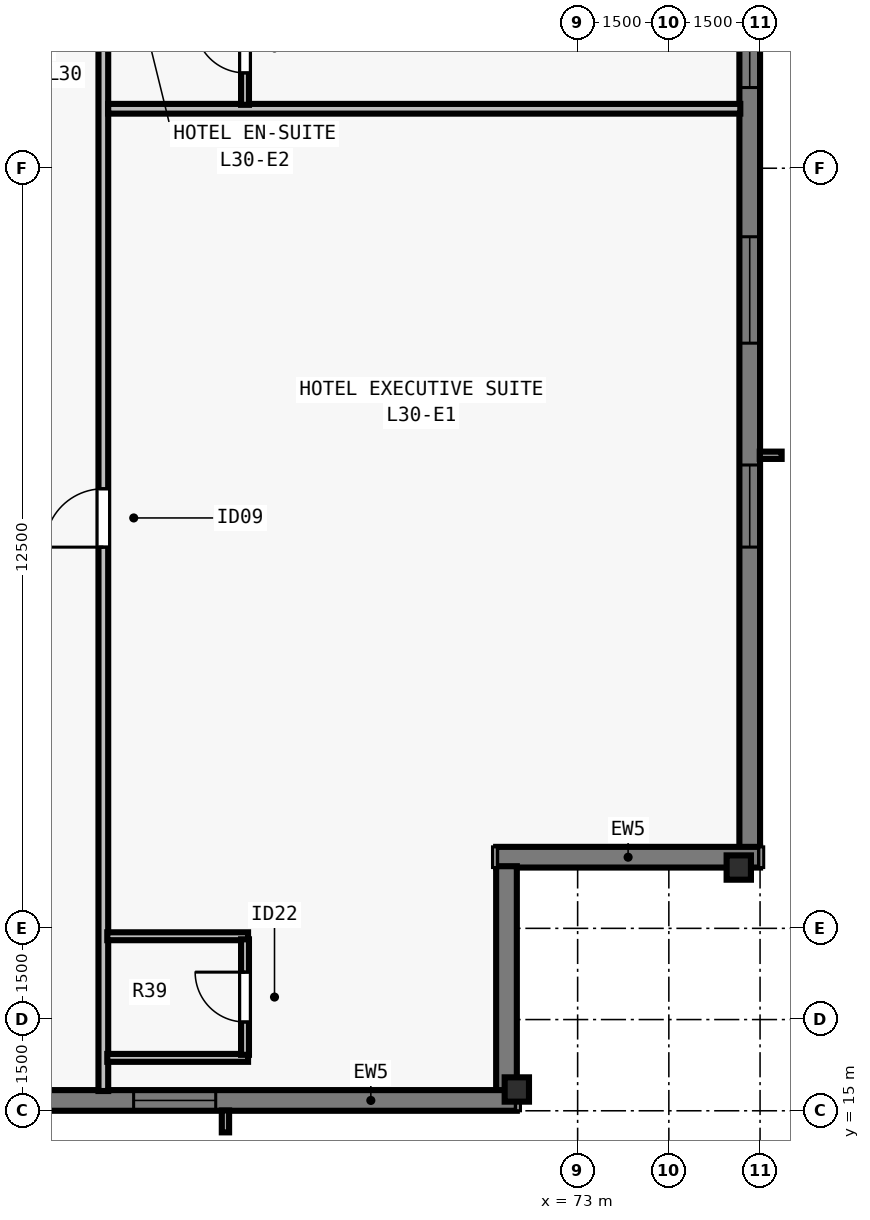
"""IFC4 building model, lengths in metres.
Left out: names, types, materials, properties, quantities, classifications, styles, units other than length and angle.
Written with IfcOpenShell. Run it as: python <this file> out.ifc"""

import sys

from ifc_helpers import new_model, si_unit, direction, frame, frame_2d, origin, origin_2d, place, context, subcontext, project, spatial, rectangle, i_section, extrude, element, fill, save


model = new_model("IFC4")
c1 = context("Model", 3, precision=1e-05, world=origin(), true_north=direction((0.0, 1.0)))
c2 = subcontext(c1, "Body", "Model", "MODEL_VIEW")
j1 = project(units=[si_unit("LENGTHUNIT", "METRE"), si_unit("PLANEANGLEUNIT", "RADIAN")], contexts=[c1])
p1 = place(None, origin())
s1 = spatial("IfcSite", under=j1, at=p1, CompositionType="ELEMENT")
p2 = place(p1, origin())
s2 = spatial("IfcBuilding", under=s1, at=p2, CompositionType="ELEMENT")
p3 = place(p2, frame((0.0, 0.0, 113.0)))
s3 = spatial("IfcBuildingStorey", under=s2, at=p3, CompositionType="ELEMENT", Elevation=113.0)
for number, where, z_axis, x_axis in (
    (1, (72.0, 15.35, 0.0), (0.0, 0.0, 1.0), (1.0, 0.0, 0.0)),
    (2, (75.65, 19.0, 0.0), (0.0, 0.0, 1.0), (0.0, 1.0, 0.0)),
):
    element("IfcColumn", number, at=place(p3, frame(where, z_axis=z_axis, x_axis=x_axis)), inside=s3, PredefinedType="COLUMN", context=c2, shape_type="SweptSolid", body=[
        extrude(i_section(OverallWidth=0.4, OverallDepth=0.4, WebThickness=0.022, FlangeThickness=0.036, at=origin_2d()), origin(), (0.0, 0.0, 1.0), 3.5),
    ])
p4 = place(p3, frame((75.83, 59.0, 0.0), z_axis=(0.0, 0.0, 1.0), x_axis=(0.0, -1.0, 0.0)))
e3 = element("IfcWall", 3, at=p4, inside=s3, PredefinedType="SOLIDWALL", context=c2, shape_type="SweptSolid", body=[
    extrude(rectangle(XDim=39.682, YDim=0.34, at=frame_2d((19.841, 0.0))), origin(), (0.0, 0.0, 1.0), 3.28),
])
p5 = place(p4, frame((4.952, 0.0, 0.8)))
e4 = element("IfcOpeningElement", 4, at=p5, cuts=e3, PredefinedType="OPENING", context=c2, shape_type="SweptSolid", body=[
    extrude(rectangle(XDim=1.35, YDim=1.66, at=frame_2d((0.675, 0.83))), frame((0.0, 0.18, 0.0), z_axis=(0.0, -1.0, 0.0), x_axis=(1.0, 0.0, 0.0)), (0.0, 0.0, 1.0), 0.36),
])
p6 = place(p4, frame((8.305, 0.0, 0.8)))
e5 = element("IfcOpeningElement", 5, at=p6, cuts=e3, PredefinedType="OPENING", context=c2, shape_type="SweptSolid", body=[
    extrude(rectangle(XDim=1.75, YDim=1.66, at=frame_2d((0.875, 0.83))), frame((0.0, 0.18, 0.0), z_axis=(0.0, -1.0, 0.0), x_axis=(1.0, 0.0, 0.0)), (0.0, 0.0, 1.0), 0.36),
])
p7 = place(p4, frame((12.909, 0.0, 0.8)))
e6 = element("IfcOpeningElement", 6, at=p7, cuts=e3, PredefinedType="OPENING", context=c2, shape_type="SweptSolid", body=[
    extrude(rectangle(XDim=1.35, YDim=1.66, at=frame_2d((0.675, 0.83))), frame((0.0, 0.18, 0.0), z_axis=(0.0, -1.0, 0.0), x_axis=(1.0, 0.0, 0.0)), (0.0, 0.0, 1.0), 0.36),
])
p8 = place(p4, frame((16.262, 0.0, 0.8)))
e7 = element("IfcOpeningElement", 7, at=p8, cuts=e3, PredefinedType="OPENING", context=c2, shape_type="SweptSolid", body=[
    extrude(rectangle(XDim=1.75, YDim=1.66, at=frame_2d((0.875, 0.83))), frame((0.0, 0.18, 0.0), z_axis=(0.0, -1.0, 0.0), x_axis=(1.0, 0.0, 0.0)), (0.0, 0.0, 1.0), 0.36),
])
p9 = place(p4, frame((19.166, 0.0, 0.8)))
e8 = element("IfcOpeningElement", 8, at=p9, cuts=e3, PredefinedType="OPENING", context=c2, shape_type="SweptSolid", body=[
    extrude(rectangle(XDim=1.35, YDim=1.66, at=frame_2d((0.675, 0.83))), frame((0.0, 0.18, 0.0), z_axis=(0.0, -1.0, 0.0), x_axis=(1.0, 0.0, 0.0)), (0.0, 0.0, 1.0), 0.36),
])
p10 = place(p4, frame((22.07, 0.0, 0.8)))
e9 = element("IfcOpeningElement", 9, at=p10, cuts=e3, PredefinedType="OPENING", context=c2, shape_type="SweptSolid", body=[
    extrude(rectangle(XDim=1.75, YDim=1.66, at=frame_2d((0.875, 0.83))), frame((0.0, 0.18, 0.0), z_axis=(0.0, -1.0, 0.0), x_axis=(1.0, 0.0, 0.0)), (0.0, 0.0, 1.0), 0.36),
])
p11 = place(p4, frame((25.823, 0.0, 0.8)))
e10 = element("IfcOpeningElement", 10, at=p11, cuts=e3, PredefinedType="OPENING", context=c2, shape_type="SweptSolid", body=[
    extrude(rectangle(XDim=1.35, YDim=1.66, at=frame_2d((0.675, 0.83))), frame((0.0, 0.18, 0.0), z_axis=(0.0, -1.0, 0.0), x_axis=(1.0, 0.0, 0.0)), (0.0, 0.0, 1.0), 0.36),
])
p12 = place(p4, frame((29.627, 0.0, 0.8)))
e11 = element("IfcOpeningElement", 11, at=p12, cuts=e3, PredefinedType="OPENING", context=c2, shape_type="SweptSolid", body=[
    extrude(rectangle(XDim=1.75, YDim=1.66, at=frame_2d((0.875, 0.83))), frame((0.0, 0.18, 0.0), z_axis=(0.0, -1.0, 0.0), x_axis=(1.0, 0.0, 0.0)), (0.0, 0.0, 1.0), 0.36),
])
p13 = place(p4, frame((33.38, 0.0, 0.8)))
e12 = element("IfcOpeningElement", 12, at=p13, cuts=e3, PredefinedType="OPENING", context=c2, shape_type="SweptSolid", body=[
    extrude(rectangle(XDim=1.35, YDim=1.66, at=frame_2d((0.675, 0.83))), frame((0.0, 0.18, 0.0), z_axis=(0.0, -1.0, 0.0), x_axis=(1.0, 0.0, 0.0)), (0.0, 0.0, 1.0), 0.36),
])
p14 = place(p3, frame((76.0, 19.17, 0.0), z_axis=(0.0, 0.0, 1.0), x_axis=(-1.0, 0.0, 0.0)))
e13 = element("IfcWall", 13, at=p14, inside=s3, PredefinedType="SOLIDWALL", context=c2, shape_type="SweptSolid", body=[
    extrude(rectangle(XDim=4.34, YDim=0.34, at=frame_2d((2.17, 0.0))), origin(), (0.0, 0.0, 1.0), 3.28),
])
p15 = place(p3, frame((71.83, 19.022, 0.0), z_axis=(0.0, 0.0, 1.0), x_axis=(0.0, -1.0, 0.0)))
e14 = element("IfcWall", 14, at=p15, inside=s3, PredefinedType="SOLIDWALL", context=c2, shape_type="SweptSolid", body=[
    extrude(rectangle(XDim=3.704, YDim=0.34, at=frame_2d((1.852, 0.0))), origin(), (0.0, 0.0, 1.0), 3.28),
])
p16 = place(p3, frame((72.0, 15.17, 0.0), z_axis=(0.0, 0.0, 1.0), x_axis=(-1.0, 0.0, 0.0)))
e15 = element("IfcWall", 15, at=p16, inside=s3, PredefinedType="SOLIDWALL", context=c2, shape_type="SweptSolid", body=[
    extrude(rectangle(XDim=39.682, YDim=0.34, at=frame_2d((19.841, 0.0))), origin(), (0.0, 0.0, 1.0), 3.28),
])
p17 = place(p16, frame((4.952, 0.0, 0.8)))
e16 = element("IfcOpeningElement", 16, at=p17, cuts=e15, PredefinedType="OPENING", context=c2, shape_type="SweptSolid", body=[
    extrude(rectangle(XDim=1.35, YDim=1.66, at=frame_2d((0.675, 0.83))), frame((0.0, 0.18, 0.0), z_axis=(0.0, -1.0, 0.0), x_axis=(1.0, 0.0, 0.0)), (0.0, 0.0, 1.0), 0.36),
])
p18 = place(p16, frame((9.555, 0.0, 0.8)))
e17 = element("IfcOpeningElement", 17, at=p18, cuts=e15, PredefinedType="OPENING", context=c2, shape_type="SweptSolid", body=[
    extrude(rectangle(XDim=1.75, YDim=1.66, at=frame_2d((0.875, 0.83))), frame((0.0, 0.18, 0.0), z_axis=(0.0, -1.0, 0.0), x_axis=(1.0, 0.0, 0.0)), (0.0, 0.0, 1.0), 0.36),
])
p19 = place(p16, frame((12.059, 0.0, 0.8)))
e18 = element("IfcOpeningElement", 18, at=p19, cuts=e15, PredefinedType="OPENING", context=c2, shape_type="SweptSolid", body=[
    extrude(rectangle(XDim=1.35, YDim=1.66, at=frame_2d((0.675, 0.83))), frame((0.0, 0.18, 0.0), z_axis=(0.0, -1.0, 0.0), x_axis=(1.0, 0.0, 0.0)), (0.0, 0.0, 1.0), 0.36),
])
p20 = place(p16, frame((16.262, 0.0, 0.8)))
e19 = element("IfcOpeningElement", 19, at=p20, cuts=e15, PredefinedType="OPENING", context=c2, shape_type="SweptSolid", body=[
    extrude(rectangle(XDim=1.75, YDim=1.66, at=frame_2d((0.875, 0.83))), frame((0.0, 0.18, 0.0), z_axis=(0.0, -1.0, 0.0), x_axis=(1.0, 0.0, 0.0)), (0.0, 0.0, 1.0), 0.36),
])
p21 = place(p16, frame((18.716, 0.0, 0.8)))
e20 = element("IfcOpeningElement", 20, at=p21, cuts=e15, PredefinedType="OPENING", context=c2, shape_type="SweptSolid", body=[
    extrude(rectangle(XDim=1.35, YDim=1.66, at=frame_2d((0.675, 0.83))), frame((0.0, 0.18, 0.0), z_axis=(0.0, -1.0, 0.0), x_axis=(1.0, 0.0, 0.0)), (0.0, 0.0, 1.0), 0.36),
])
p22 = place(p16, frame((22.07, 0.0, 0.8)))
e21 = element("IfcOpeningElement", 21, at=p22, cuts=e15, PredefinedType="OPENING", context=c2, shape_type="SweptSolid", body=[
    extrude(rectangle(XDim=1.75, YDim=1.66, at=frame_2d((0.875, 0.83))), frame((0.0, 0.18, 0.0), z_axis=(0.0, -1.0, 0.0), x_axis=(1.0, 0.0, 0.0)), (0.0, 0.0, 1.0), 0.36),
])
p23 = place(p16, frame((26.273, 0.0, 0.8)))
e22 = element("IfcOpeningElement", 22, at=p23, cuts=e15, PredefinedType="OPENING", context=c2, shape_type="SweptSolid", body=[
    extrude(rectangle(XDim=1.35, YDim=1.66, at=frame_2d((0.675, 0.83))), frame((0.0, 0.18, 0.0), z_axis=(0.0, -1.0, 0.0), x_axis=(1.0, 0.0, 0.0)), (0.0, 0.0, 1.0), 0.36),
])
p24 = place(p16, frame((28.777, 0.0, 0.8)))
e23 = element("IfcOpeningElement", 23, at=p24, cuts=e15, PredefinedType="OPENING", context=c2, shape_type="SweptSolid", body=[
    extrude(rectangle(XDim=1.75, YDim=1.66, at=frame_2d((0.875, 0.83))), frame((0.0, 0.18, 0.0), z_axis=(0.0, -1.0, 0.0), x_axis=(1.0, 0.0, 0.0)), (0.0, 0.0, 1.0), 0.36),
])
p25 = place(p16, frame((33.83, 0.0, 0.8)))
e24 = element("IfcOpeningElement", 24, at=p25, cuts=e15, PredefinedType="OPENING", context=c2, shape_type="SweptSolid", body=[
    extrude(rectangle(XDim=1.35, YDim=1.66, at=frame_2d((0.675, 0.83))), frame((0.0, 0.18, 0.0), z_axis=(0.0, -1.0, 0.0), x_axis=(1.0, 0.0, 0.0)), (0.0, 0.0, 1.0), 0.36),
])
p26 = place(p3, frame((65.2, 15.325, 0.0), z_axis=(0.0, 0.0, 1.0), x_axis=(0.0, 1.0, 0.0)))
e25 = element("IfcWall", 25, at=p26, inside=s3, PredefinedType="PARTITIONING", context=c2, shape_type="SweptSolid", body=[
    extrude(rectangle(XDim=47.35, YDim=0.16, at=frame_2d((23.675, 0.0))), origin(), (0.0, 0.0, 1.0), 2.555),
])
p27 = place(p26, frame((8.944, 0.0, 0.0)))
e26 = element("IfcOpeningElement", 26, at=p27, cuts=e25, PredefinedType="OPENING", context=c2, shape_type="SweptSolid", body=[
    extrude(rectangle(XDim=0.96, YDim=2.15, at=frame_2d((0.48, 1.075))), frame((0.0, 0.09, 0.0), z_axis=(0.0, -1.0, 0.0), x_axis=(1.0, 0.0, 0.0)), (0.0, 0.0, 1.0), 0.18),
])
p28 = place(p26, frame((24.322, 0.0, 0.0)))
e27 = element("IfcOpeningElement", 27, at=p28, cuts=e25, PredefinedType="OPENING", context=c2, shape_type="SweptSolid", body=[
    extrude(rectangle(XDim=0.96, YDim=2.15, at=frame_2d((0.48, 1.075))), frame((0.0, 0.09, 0.0), z_axis=(0.0, -1.0, 0.0), x_axis=(1.0, 0.0, 0.0)), (0.0, 0.0, 1.0), 0.18),
])
p29 = place(p26, frame((39.873, 0.0, 0.0)))
e28 = element("IfcOpeningElement", 28, at=p29, cuts=e25, PredefinedType="OPENING", context=c2, shape_type="SweptSolid", body=[
    extrude(rectangle(XDim=0.96, YDim=2.15, at=frame_2d((0.48, 1.075))), frame((0.0, 0.09, 0.0), z_axis=(0.0, -1.0, 0.0), x_axis=(1.0, 0.0, 0.0)), (0.0, 0.0, 1.0), 0.18),
])
for number, where, z_axis, x_axis in (
    (29, (65.265, 15.87, 0.0), (0.0, 0.0, 1.0), (1.0, 0.0, 0.0)),
    (30, (65.265, 17.87, 0.0), (0.0, 0.0, 1.0), (1.0, 0.0, 0.0)),
):
    element("IfcWall", number, at=place(p3, frame(where, z_axis=z_axis, x_axis=x_axis)), inside=s3, PredefinedType="PLUMBINGWALL", context=c2, shape_type="SweptSolid", body=[
        extrude(rectangle(XDim=2.315, YDim=0.13, at=frame_2d((1.158, 0.0))), origin(), (0.0, 0.0, 1.0), 3.28),
    ])
p30 = place(p3, frame((67.53, 15.92, 0.0), z_axis=(0.0, 0.0, 1.0), x_axis=(0.0, 1.0, 0.0)))
e31 = element("IfcWall", 31, at=p30, inside=s3, PredefinedType="PLUMBINGWALL", context=c2, shape_type="SweptSolid", body=[
    extrude(rectangle(XDim=1.9, YDim=0.13, at=frame_2d((0.95, 0.0))), origin(), (0.0, 0.0, 1.0), 3.28),
])
p31 = place(p30, frame((0.54, 0.0, 0.0)))
e32 = element("IfcOpeningElement", 32, at=p31, cuts=e31, PredefinedType="OPENING", context=c2, shape_type="SweptSolid", body=[
    extrude(rectangle(XDim=0.82, YDim=2.1, at=frame_2d((0.41, 1.05))), frame((0.0, 0.075, 0.0), z_axis=(0.0, -1.0, 0.0), x_axis=(1.0, 0.0, 0.0)), (0.0, 0.0, 1.0), 0.15),
])
p32 = place(p3, frame((65.28, 31.478, 0.0), z_axis=(0.0, 0.0, 1.0), x_axis=(1.0, 0.0, 0.0)))
e33 = element("IfcWall", 33, at=p32, inside=s3, PredefinedType="PARTITIONING", context=c2, shape_type="SweptSolid", body=[
    extrude(rectangle(XDim=10.395, YDim=0.16, at=frame_2d((5.198, 0.0))), origin(), (0.0, 0.0, 1.0), 3.28),
])
p33 = place(p3, frame((67.53, 31.543, 0.0), z_axis=(0.0, 0.0, 1.0), x_axis=(0.0, 1.0, 0.0)))
e34 = element("IfcWall", 34, at=p33, inside=s3, PredefinedType="PLUMBINGWALL", context=c2, shape_type="SweptSolid", body=[
    extrude(rectangle(XDim=1.885, YDim=0.13, at=frame_2d((0.942, 0.0))), origin(), (0.0, 0.0, 1.0), 3.28),
])
p34 = place(p33, frame((0.525, 0.0, 0.0)))
e35 = element("IfcOpeningElement", 35, at=p34, cuts=e34, PredefinedType="OPENING", context=c2, shape_type="SweptSolid", body=[
    extrude(rectangle(XDim=0.82, YDim=2.1, at=frame_2d((0.41, 1.05))), frame((0.0, 0.075, 0.0), z_axis=(0.0, -1.0, 0.0), x_axis=(1.0, 0.0, 0.0)), (0.0, 0.0, 1.0), 0.15),
])
p35 = place(p11, origin())
e36 = element("IfcWindow", 36, at=p35, inside=s3, PartitioningType="SINGLE_PANEL", PredefinedType="WINDOW", context=c2, shape_type="SweptSolid", body=[
    extrude(rectangle(XDim=1.35, YDim=1.66, at=frame_2d((0.675, 0.83))), frame((0.0, -0.05, 0.0), z_axis=(0.0, -1.0, 0.0), x_axis=(1.0, 0.0, 0.0)), (0.0, 0.0, 1.0), 0.06),
])
fill(e10, e36)
p36 = place(p12, origin())
e37 = element("IfcWindow", 37, at=p36, inside=s3, PartitioningType="SINGLE_PANEL", PredefinedType="WINDOW", context=c2, shape_type="SweptSolid", body=[
    extrude(rectangle(XDim=1.75, YDim=1.66, at=frame_2d((0.875, 0.83))), frame((0.0, -0.05, 0.0), z_axis=(0.0, -1.0, 0.0), x_axis=(1.0, 0.0, 0.0)), (0.0, 0.0, 1.0), 0.06),
])
fill(e11, e37)
p37 = place(p13, origin())
e38 = element("IfcWindow", 38, at=p37, inside=s3, PartitioningType="SINGLE_PANEL", PredefinedType="WINDOW", context=c2, shape_type="SweptSolid", body=[
    extrude(rectangle(XDim=1.35, YDim=1.66, at=frame_2d((0.675, 0.83))), frame((0.0, -0.05, 0.0), z_axis=(0.0, -1.0, 0.0), x_axis=(1.0, 0.0, 0.0)), (0.0, 0.0, 1.0), 0.06),
])
fill(e12, e38)
p38 = place(p17, origin())
e39 = element("IfcWindow", 39, at=p38, inside=s3, PartitioningType="SINGLE_PANEL", PredefinedType="WINDOW", context=c2, shape_type="SweptSolid", body=[
    extrude(rectangle(XDim=1.35, YDim=1.66, at=frame_2d((0.675, 0.83))), frame((0.0, -0.05, 0.0), z_axis=(0.0, -1.0, 0.0), x_axis=(1.0, 0.0, 0.0)), (0.0, 0.0, 1.0), 0.06),
])
fill(e16, e39)
p39 = place(p31, origin())
e40 = element("IfcDoor", 40, at=p39, inside=s3, OperationType="SINGLE_SWING_RIGHT", PredefinedType="DOOR", context=c2, shape_type="SweptSolid", body=[
    extrude(rectangle(XDim=0.82, YDim=2.1, at=frame_2d((0.41, 1.05))), frame((0.0, 0.025, 0.0), z_axis=(0.0, -1.0, 0.0), x_axis=(1.0, 0.0, 0.0)), (0.0, 0.0, 1.0), 0.05),
])
fill(e32, e40)
p40 = place(p27, origin())
e41 = element("IfcDoor", 41, at=p40, inside=s3, OperationType="SINGLE_SWING_LEFT", PredefinedType="DOOR", context=c2, shape_type="SweptSolid", body=[
    extrude(rectangle(XDim=0.96, YDim=2.15, at=frame_2d((0.48, 1.075))), frame((0.0, 0.025, 0.0), z_axis=(0.0, -1.0, 0.0), x_axis=(1.0, 0.0, 0.0)), (0.0, 0.0, 1.0), 0.05),
])
fill(e26, e41)
p41 = place(p34, origin())
e42 = element("IfcDoor", 42, at=p41, inside=s3, OperationType="SINGLE_SWING_RIGHT", PredefinedType="DOOR", context=c2, shape_type="SweptSolid", body=[
    extrude(rectangle(XDim=0.82, YDim=2.1, at=frame_2d((0.41, 1.05))), frame((0.0, 0.025, 0.0), z_axis=(0.0, -1.0, 0.0), x_axis=(1.0, 0.0, 0.0)), (0.0, 0.0, 1.0), 0.05),
])
fill(e35, e42)
save(model, sys.argv[1])
